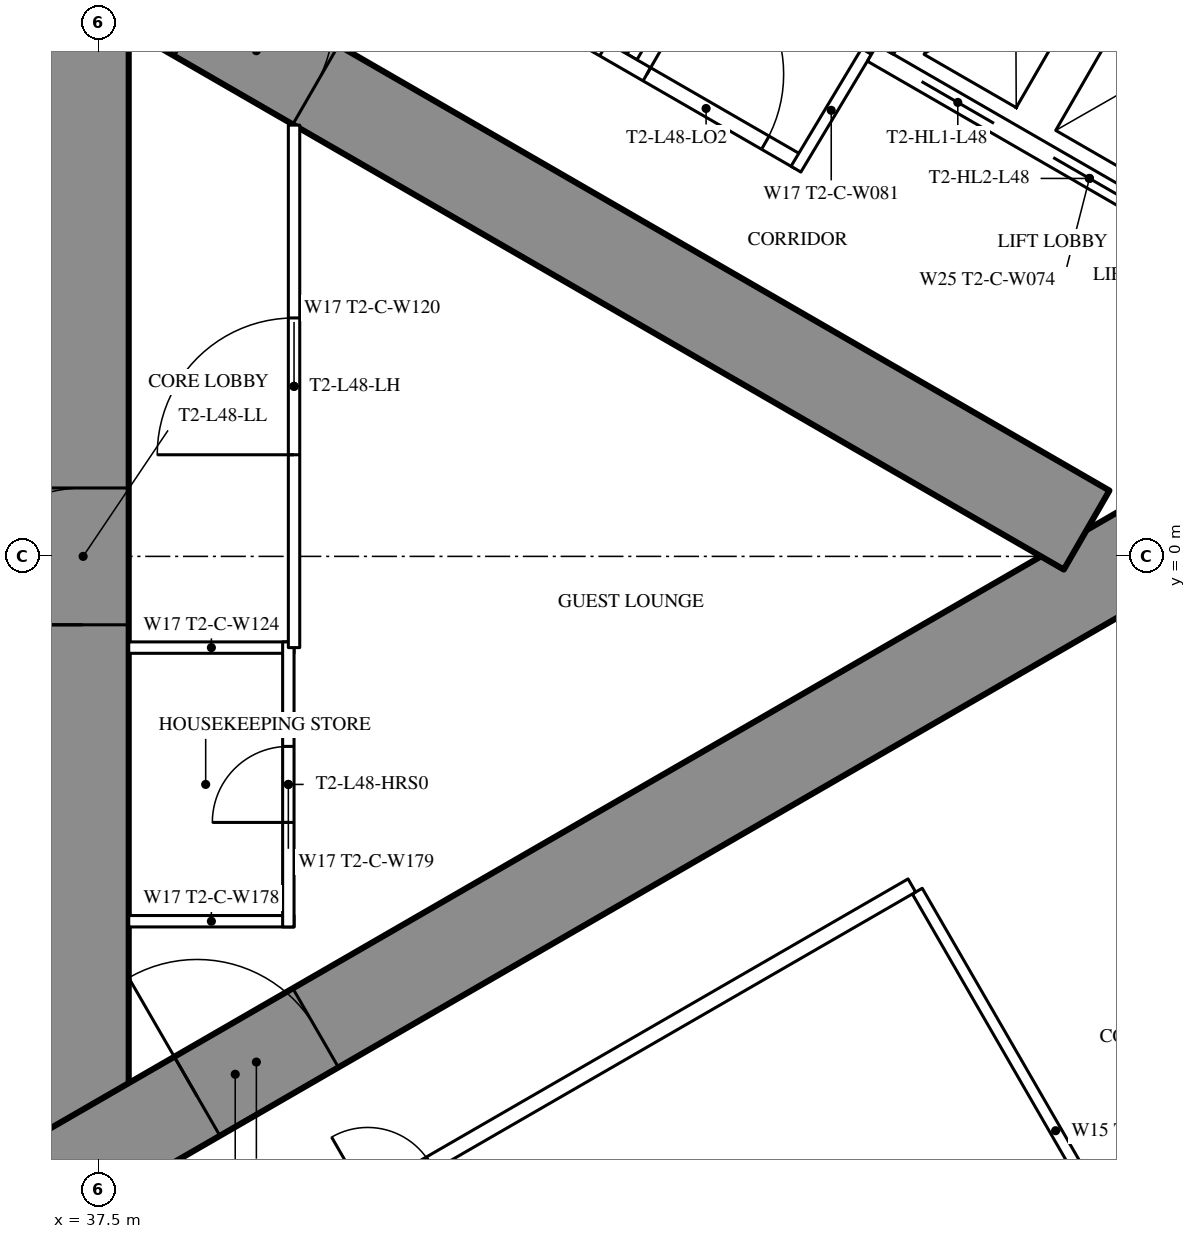
"""IFC4 building model, lengths in metres.
Left out: names, types, materials, properties, quantities, classifications, styles, units other than length and angle.
Written with IfcOpenShell. Run it as: python <this file> out.ifc"""

import sys

from ifc_helpers import new_model, si_unit, direction, frame, frame_2d, origin, place, context, subcontext, project, spatial, rectangle, extrude, element, fill, save


model = new_model("IFC4")
c1 = context("Model", 3, precision=1e-05, world=origin(), true_north=direction((0.0, 1.0)))
c2 = subcontext(c1, "Body", "Model", "MODEL_VIEW")
j1 = project(units=[si_unit("LENGTHUNIT", "METRE"), si_unit("PLANEANGLEUNIT", "RADIAN")], contexts=[c1])
p1 = place(None, origin())
s1 = spatial("IfcSite", under=j1, at=p1, CompositionType="ELEMENT")
p2 = place(p1, origin())
s2 = spatial("IfcBuilding", under=s1, at=p2, CompositionType="ELEMENT")
p3 = place(p2, frame((0.0, 0.0, 180.8)))
s3 = spatial("IfcBuildingStorey", under=s2, at=p3, CompositionType="ELEMENT", Elevation=180.8)
p4 = place(p3, frame((37.3, -8.6, 0.0), z_axis=(0.0, 0.0, 1.0), x_axis=(0.0, 1.0, 0.0)))
e1 = element("IfcWall", 1, at=p4, inside=s3, PredefinedType="SHEAR", context=c2, shape_type="SweptSolid", body=[
    extrude(rectangle(XDim=17.2, YDim=1.2, at=frame_2d((8.6, 0.0))), origin(), (0.0, 0.0, 1.0), 3.5),
])
p5 = place(p4, frame((7.7, 0.0, 0.0)))
e2 = element("IfcOpeningElement", 2, at=p5, cuts=e1, PredefinedType="OPENING", context=c2, shape_type="SweptSolid", body=[
    extrude(rectangle(XDim=1.8, YDim=2.2, at=frame_2d((0.9, 1.1))), frame((0.0, 0.61, 0.0), z_axis=(0.0, -1.0, 0.0), x_axis=(1.0, 0.0, 0.0)), (0.0, 0.0, 1.0), 1.22),
])
p6 = place(p3, frame((27.2, -13.8, 0.0), z_axis=(0.0, 0.0, 1.0), x_axis=(0.866027159892, 0.499996958321, 0.0)))
e3 = element("IfcWall", 3, at=p6, inside=s3, PredefinedType="SHEAR", context=c2, shape_type="SweptSolid", body=[
    extrude(rectangle(XDim=27.947, YDim=1.2, at=frame_2d((13.973, 0.0))), origin(), (0.0, 0.0, 1.0), 3.5),
])
p7 = place(p6, frame((4.6, 0.0, 0.0)))
e4 = element("IfcOpeningElement", 4, at=p7, cuts=e3, PredefinedType="OPENING", context=c2, shape_type="SweptSolid", body=[
    extrude(rectangle(XDim=1.0, YDim=2.2, at=frame_2d((0.5, 1.1))), frame((0.0, 0.61, 0.0), z_axis=(0.0, -1.0, 0.0), x_axis=(1.0, 0.0, 0.0)), (0.0, 0.0, 1.0), 1.22),
])
p8 = place(p6, frame((13.395, 0.0, 0.0)))
e5 = element("IfcOpeningElement", 5, at=p8, cuts=e3, PredefinedType="OPENING", context=c2, shape_type="SweptSolid", body=[
    extrude(rectangle(XDim=1.8, YDim=2.2, at=frame_2d((0.9, 1.1))), frame((0.0, 0.61, 0.0), z_axis=(0.0, -1.0, 0.0), x_axis=(1.0, 0.0, 0.0)), (0.0, 0.0, 1.0), 1.22),
])
p9 = place(p3, frame((27.2, 13.8, 0.0), z_axis=(0.0, 0.0, 1.0), x_axis=(0.866024515034, -0.500001539357, 0.0)))
e6 = element("IfcWall", 6, at=p9, inside=s3, PredefinedType="SHEAR", context=c2, shape_type="SweptSolid", body=[
    extrude(rectangle(XDim=26.907, YDim=1.2, at=frame_2d((13.454, 0.0))), origin(), (0.0, 0.0, 1.0), 3.5),
])
p10 = place(p9, frame((4.6, 0.0, 0.0)))
e7 = element("IfcOpeningElement", 7, at=p10, cuts=e6, PredefinedType="OPENING", context=c2, shape_type="SweptSolid", body=[
    extrude(rectangle(XDim=1.0, YDim=2.2, at=frame_2d((0.5, 1.1))), frame((0.0, 0.61, 0.0), z_axis=(0.0, -1.0, 0.0), x_axis=(1.0, 0.0, 0.0)), (0.0, 0.0, 1.0), 1.22),
])
p11 = place(p9, frame((13.395, 0.0, 0.0)))
e8 = element("IfcOpeningElement", 8, at=p11, cuts=e6, PredefinedType="OPENING", context=c2, shape_type="SweptSolid", body=[
    extrude(rectangle(XDim=1.8, YDim=2.2, at=frame_2d((0.9, 1.1))), frame((0.0, 0.61, 0.0), z_axis=(0.0, -1.0, 0.0), x_axis=(1.0, 0.0, 0.0)), (0.0, 0.0, 1.0), 1.22),
])
p12 = place(p3, frame((48.275, -4.404, 0.0), z_axis=(0.0, 0.0, 1.0), x_axis=(0.500006004368, -0.866021937133, 0.0)))
e9 = element("IfcWall", 9, at=p12, inside=s3, PredefinedType="PARTITIONING", context=c2, shape_type="SweptSolid", body=[
    extrude(rectangle(XDim=7.279, YDim=0.15, at=frame_2d((3.64, 0.0))), origin(), (0.0, 0.0, 1.0), 2.3),
])
p13 = place(p3, frame((44.521, 6.571, 0.0), z_axis=(0.0, 0.0, 1.0), x_axis=(0.500020376429, 0.866013639128, 0.0)))
e10 = element("IfcWall", 10, at=p13, inside=s3, PredefinedType="PARTITIONING", context=c2, shape_type="SweptSolid", body=[
    extrude(rectangle(XDim=7.306, YDim=0.15, at=frame_2d((3.653, 0.0))), origin(), (0.0, 0.0, 1.0), 2.3),
])
p14 = place(p3, frame((27.959, 16.017, 0.0), z_axis=(0.0, 0.0, 1.0), x_axis=(0.866027146794, -0.499996981007, 0.0)))
e11 = element("IfcWall", 11, at=p14, inside=s3, PredefinedType="PARTITIONING", context=c2, shape_type="SweptSolid", body=[
    extrude(rectangle(XDim=21.657, YDim=0.2, at=frame_2d((10.829, 0.0))), origin(), (0.0, 0.0, 1.0), 3.25),
])
p15 = place(p14, frame((17.741, 0.0, 0.0)))
e12 = element("IfcOpeningElement", 12, at=p15, cuts=e11, PredefinedType="OPENING", context=c2, shape_type="SweptSolid", body=[
    extrude(rectangle(XDim=0.95, YDim=2.2, at=frame_2d((0.475, 1.1))), frame((0.0, 0.11, 0.0), z_axis=(0.0, -1.0, 0.0), x_axis=(1.0, 0.0, 0.0)), (0.0, 0.0, 1.0), 0.22),
])
p16 = place(p14, frame((10.782, 0.0, 0.0)))
e13 = element("IfcOpeningElement", 13, at=p16, cuts=e11, PredefinedType="OPENING", context=c2, shape_type="SweptSolid", body=[
    extrude(rectangle(XDim=0.95, YDim=2.2, at=frame_2d((0.475, 1.1))), frame((0.0, 0.11, 0.0), z_axis=(0.0, -1.0, 0.0), x_axis=(1.0, 0.0, 0.0)), (0.0, 0.0, 1.0), 0.22),
])
p17 = place(p14, frame((6.732, 0.0, 0.0)))
e14 = element("IfcOpeningElement", 14, at=p17, cuts=e11, PredefinedType="OPENING", context=c2, shape_type="SweptSolid", body=[
    extrude(rectangle(XDim=0.95, YDim=2.2, at=frame_2d((0.475, 1.1))), frame((0.0, 0.11, 0.0), z_axis=(0.0, -1.0, 0.0), x_axis=(1.0, 0.0, 0.0)), (0.0, 0.0, 1.0), 0.22),
])
p18 = place(p14, frame((19.349, 0.0, 0.0)))
e15 = element("IfcOpeningElement", 15, at=p18, cuts=e11, PredefinedType="OPENING", context=c2, shape_type="SweptSolid", body=[
    extrude(rectangle(XDim=1.8, YDim=2.2, at=frame_2d((0.9, 1.1))), frame((0.0, 0.11, 0.0), z_axis=(0.0, -1.0, 0.0), x_axis=(1.0, 0.0, 0.0)), (0.0, 0.0, 1.0), 0.22),
])
p19 = place(p3, frame((47.606, 6.643, 0.0), z_axis=(0.0, 0.0, 1.0), x_axis=(-0.514237157483, -0.857648031458, 0.0)))
e16 = element("IfcWall", 16, at=p19, inside=s3, PredefinedType="PARTITIONING", context=c2, shape_type="SweptSolid", body=[
    extrude(rectangle(XDim=1.805, YDim=0.15, at=frame_2d((0.902, 0.0))), origin(), (0.0, 0.0, 1.0), 3.25),
])
p20 = place(p3, frame((27.959, -16.017, 0.0), z_axis=(0.0, 0.0, 1.0), x_axis=(0.866024180982, 0.50000211795, 0.0)))
e17 = element("IfcWall", 17, at=p20, inside=s3, PredefinedType="PARTITIONING", context=c2, shape_type="SweptSolid", body=[
    extrude(rectangle(XDim=23.375, YDim=0.2, at=frame_2d((11.688, 0.0))), origin(), (0.0, 0.0, 1.0), 3.25),
])
p21 = place(p20, frame((2.415, 0.0, 0.0)))
e18 = element("IfcOpeningElement", 18, at=p21, cuts=e17, PredefinedType="OPENING", context=c2, shape_type="SweptSolid", body=[
    extrude(rectangle(XDim=0.95, YDim=2.2, at=frame_2d((0.475, 1.1))), frame((0.0, 0.11, 0.0), z_axis=(0.0, -1.0, 0.0), x_axis=(1.0, 0.0, 0.0)), (0.0, 0.0, 1.0), 0.22),
])
p22 = place(p20, frame((9.215, 0.0, 0.0)))
e19 = element("IfcOpeningElement", 19, at=p22, cuts=e17, PredefinedType="OPENING", context=c2, shape_type="SweptSolid", body=[
    extrude(rectangle(XDim=1.0, YDim=2.2, at=frame_2d((0.5, 1.1))), frame((0.0, 0.11, 0.0), z_axis=(0.0, -1.0, 0.0), x_axis=(1.0, 0.0, 0.0)), (0.0, 0.0, 1.0), 0.22),
])
p23 = place(p20, frame((15.109, 0.0, 0.0)))
e20 = element("IfcOpeningElement", 20, at=p23, cuts=e17, PredefinedType="OPENING", context=c2, shape_type="SweptSolid", body=[
    extrude(rectangle(XDim=0.95, YDim=2.2, at=frame_2d((0.475, 1.1))), frame((0.0, 0.11, 0.0), z_axis=(0.0, -1.0, 0.0), x_axis=(1.0, 0.0, 0.0)), (0.0, 0.0, 1.0), 0.22),
])
for number, where, z_axis, x_axis in (
    (21, (37.9, -1.2, 0.0), (0.0, 0.0, 1.0), (1.0, 0.0, 0.0)),
    (22, (37.9, -4.8, 0.0), (0.0, 0.0, 1.0), (1.0, 0.0, 0.0)),
):
    element("IfcWall", number, at=place(p3, frame(where, z_axis=z_axis, x_axis=x_axis)), inside=s3, PredefinedType="PARTITIONING", context=c2, shape_type="SweptSolid", body=[
        extrude(rectangle(XDim=2.175, YDim=0.15, at=frame_2d((1.087, 0.0))), origin(), (0.0, 0.0, 1.0), 3.25),
    ])
p24 = place(p3, frame((40.0, -4.875, 0.0), z_axis=(0.0, 0.0, 1.0), x_axis=(0.0, 1.0, 0.0)))
e23 = element("IfcWall", 23, at=p24, inside=s3, PredefinedType="PARTITIONING", context=c2, shape_type="SweptSolid", body=[
    extrude(rectangle(XDim=3.75, YDim=0.15, at=frame_2d((1.875, 0.0))), origin(), (0.0, 0.0, 1.0), 3.25),
])
p25 = place(p24, frame((1.375, 0.0, 0.0)))
e24 = element("IfcOpeningElement", 24, at=p25, cuts=e23, PredefinedType="OPENING", context=c2, shape_type="SweptSolid", body=[
    extrude(rectangle(XDim=1.0, YDim=2.2, at=frame_2d((0.5, 1.1))), frame((0.0, 0.085, 0.0), z_axis=(0.0, -1.0, 0.0), x_axis=(1.0, 0.0, 0.0)), (0.0, 0.0, 1.0), 0.17),
])
p26 = place(p3, frame((40.075, -1.2, 0.0), z_axis=(0.0, 0.0, 1.0), x_axis=(0.0, 1.0, 0.0)))
e25 = element("IfcWall", 25, at=p26, inside=s3, PredefinedType="PARTITIONING", context=c2, shape_type="SweptSolid", body=[
    extrude(rectangle(XDim=6.874, YDim=0.15, at=frame_2d((3.437, 0.0))), origin(), (0.0, 0.0, 1.0), 3.25),
])
p27 = place(p26, frame((2.537, 0.0, 0.0)))
e26 = element("IfcOpeningElement", 26, at=p27, cuts=e25, PredefinedType="OPENING", context=c2, shape_type="SweptSolid", body=[
    extrude(rectangle(XDim=1.8, YDim=2.2, at=frame_2d((0.9, 1.1))), frame((0.0, 0.085, 0.0), z_axis=(0.0, -1.0, 0.0), x_axis=(1.0, 0.0, 0.0)), (0.0, 0.0, 1.0), 0.17),
])
p28 = place(p3, frame((47.681, 6.622, 0.0), z_axis=(0.0, 0.0, 1.0), x_axis=(0.86603344179, -0.499986077507, 0.0)))
e27 = element("IfcWall", 27, at=p28, inside=s3, PredefinedType="PARTITIONING", context=c2, shape_type="SweptSolid", body=[
    extrude(rectangle(XDim=6.6, YDim=0.25, at=frame_2d((3.3, 0.0))), origin(), (0.0, 0.0, 1.0), 3.25),
])
p29 = place(p28, frame((0.75, 0.0, 0.0)))
e28 = element("IfcOpeningElement", 28, at=p29, cuts=e27, PredefinedType="OPENING", context=c2, shape_type="SweptSolid", body=[
    extrude(rectangle(XDim=1.1, YDim=2.2, at=frame_2d((0.55, 1.1))), frame((0.0, 0.135, 0.0), z_axis=(0.0, -1.0, 0.0), x_axis=(1.0, 0.0, 0.0)), (0.0, 0.0, 1.0), 0.27),
])
p30 = place(p28, frame((2.75, 0.0, 0.0)))
e29 = element("IfcOpeningElement", 29, at=p30, cuts=e27, PredefinedType="OPENING", context=c2, shape_type="SweptSolid", body=[
    extrude(rectangle(XDim=1.1, YDim=2.2, at=frame_2d((0.55, 1.1))), frame((0.0, 0.135, 0.0), z_axis=(0.0, -1.0, 0.0), x_axis=(1.0, 0.0, 0.0)), (0.0, 0.0, 1.0), 0.27),
])
p31 = place(p28, frame((4.75, 0.0, 0.0)))
e30 = element("IfcOpeningElement", 30, at=p31, cuts=e27, PredefinedType="OPENING", context=c2, shape_type="SweptSolid", body=[
    extrude(rectangle(XDim=1.1, YDim=2.2, at=frame_2d((0.55, 1.1))), frame((0.0, 0.135, 0.0), z_axis=(0.0, -1.0, 0.0), x_axis=(1.0, 0.0, 0.0)), (0.0, 0.0, 1.0), 0.27),
])
p32 = place(p3, frame((49.406, 9.611, 0.0), z_axis=(0.0, 0.0, 1.0), x_axis=(0.86603344179, -0.499986077507, 0.0)))
e31 = element("IfcWall", 31, at=p32, inside=s3, PredefinedType="PARTITIONING", context=c2, shape_type="SweptSolid", body=[
    extrude(rectangle(XDim=6.6, YDim=0.25, at=frame_2d((3.3, 0.0))), origin(), (0.0, 0.0, 1.0), 3.25),
])
p33 = place(p3, frame((47.852, 6.668, 0.0), z_axis=(0.0, 0.0, 1.0), x_axis=(0.499929347863, 0.866066190972, 0.0)))
e32 = element("IfcWall", 32, at=p33, inside=s3, PredefinedType="PARTITIONING", context=c2, shape_type="SweptSolid", body=[
    extrude(rectangle(XDim=3.201, YDim=0.25, at=frame_2d((1.6, 0.0))), origin(), (0.0, 0.0, 1.0), 3.25),
])
p34 = place(p18, origin())
e33 = element("IfcDoor", 33, at=p34, inside=s3, OperationType="DOUBLE_DOOR_SINGLE_SWING", PredefinedType="DOOR", context=c2, shape_type="SweptSolid", body=[
    extrude(rectangle(XDim=1.8, YDim=2.2, at=frame_2d((0.9, 1.1))), frame((0.0, 0.025, 0.0), z_axis=(0.0, -1.0, 0.0), x_axis=(1.0, 0.0, 0.0)), (0.0, 0.0, 1.0), 0.05),
])
fill(e15, e33)
p35 = place(p25, origin())
e34 = element("IfcDoor", 34, at=p35, inside=s3, OperationType="SINGLE_SWING_LEFT", PredefinedType="DOOR", context=c2, shape_type="SweptSolid", body=[
    extrude(rectangle(XDim=1.0, YDim=2.2, at=frame_2d((0.5, 1.1))), frame((0.0, 0.025, 0.0), z_axis=(0.0, -1.0, 0.0), x_axis=(1.0, 0.0, 0.0)), (0.0, 0.0, 1.0), 0.05),
])
fill(e24, e34)
p36 = place(p27, origin())
e35 = element("IfcDoor", 35, at=p36, inside=s3, OperationType="DOUBLE_DOOR_SINGLE_SWING", PredefinedType="DOOR", context=c2, shape_type="SweptSolid", body=[
    extrude(rectangle(XDim=1.8, YDim=2.2, at=frame_2d((0.9, 1.1))), frame((0.0, 0.025, 0.0), z_axis=(0.0, -1.0, 0.0), x_axis=(1.0, 0.0, 0.0)), (0.0, 0.0, 1.0), 0.05),
])
fill(e26, e35)
p37 = place(p8, origin())
e36 = element("IfcDoor", 36, at=p37, inside=s3, OperationType="DOUBLE_DOOR_SINGLE_SWING", PredefinedType="DOOR", context=c2, shape_type="SweptSolid", body=[
    extrude(rectangle(XDim=1.8, YDim=2.2, at=frame_2d((0.9, 1.1))), frame((0.0, 0.025, 0.0), z_axis=(0.0, -1.0, 0.0), x_axis=(1.0, 0.0, 0.0)), (0.0, 0.0, 1.0), 0.05),
])
fill(e5, e36)
p38 = place(p11, origin())
e37 = element("IfcDoor", 37, at=p38, inside=s3, OperationType="DOUBLE_DOOR_SINGLE_SWING", PredefinedType="DOOR", context=c2, shape_type="SweptSolid", body=[
    extrude(rectangle(XDim=1.8, YDim=2.2, at=frame_2d((0.9, 1.1))), frame((0.0, 0.025, 0.0), z_axis=(0.0, -1.0, 0.0), x_axis=(1.0, 0.0, 0.0)), (0.0, 0.0, 1.0), 0.05),
])
fill(e8, e37)
p39 = place(p5, origin())
e38 = element("IfcDoor", 38, at=p39, inside=s3, OperationType="DOUBLE_DOOR_SINGLE_SWING", PredefinedType="DOOR", context=c2, shape_type="SweptSolid", body=[
    extrude(rectangle(XDim=1.8, YDim=2.2, at=frame_2d((0.9, 1.1))), frame((0.0, 0.025, 0.0), z_axis=(0.0, -1.0, 0.0), x_axis=(1.0, 0.0, 0.0)), (0.0, 0.0, 1.0), 0.05),
])
fill(e2, e38)
p40 = place(p29, origin())
e39 = element("IfcDoor", 39, at=p40, inside=s3, OperationType="DOUBLE_DOOR_SLIDING", PredefinedType="USERDEFINED", context=c2, shape_type="SweptSolid", body=[
    extrude(rectangle(XDim=1.1, YDim=2.2, at=frame_2d((0.55, 1.1))), frame((0.0, 0.025, 0.0), z_axis=(0.0, -1.0, 0.0), x_axis=(1.0, 0.0, 0.0)), (0.0, 0.0, 1.0), 0.05),
])
fill(e28, e39)
p41 = place(p30, origin())
e40 = element("IfcDoor", 40, at=p41, inside=s3, OperationType="DOUBLE_DOOR_SLIDING", PredefinedType="USERDEFINED", context=c2, shape_type="SweptSolid", body=[
    extrude(rectangle(XDim=1.1, YDim=2.2, at=frame_2d((0.55, 1.1))), frame((0.0, 0.025, 0.0), z_axis=(0.0, -1.0, 0.0), x_axis=(1.0, 0.0, 0.0)), (0.0, 0.0, 1.0), 0.05),
])
fill(e29, e40)
save(model, sys.argv[1])
